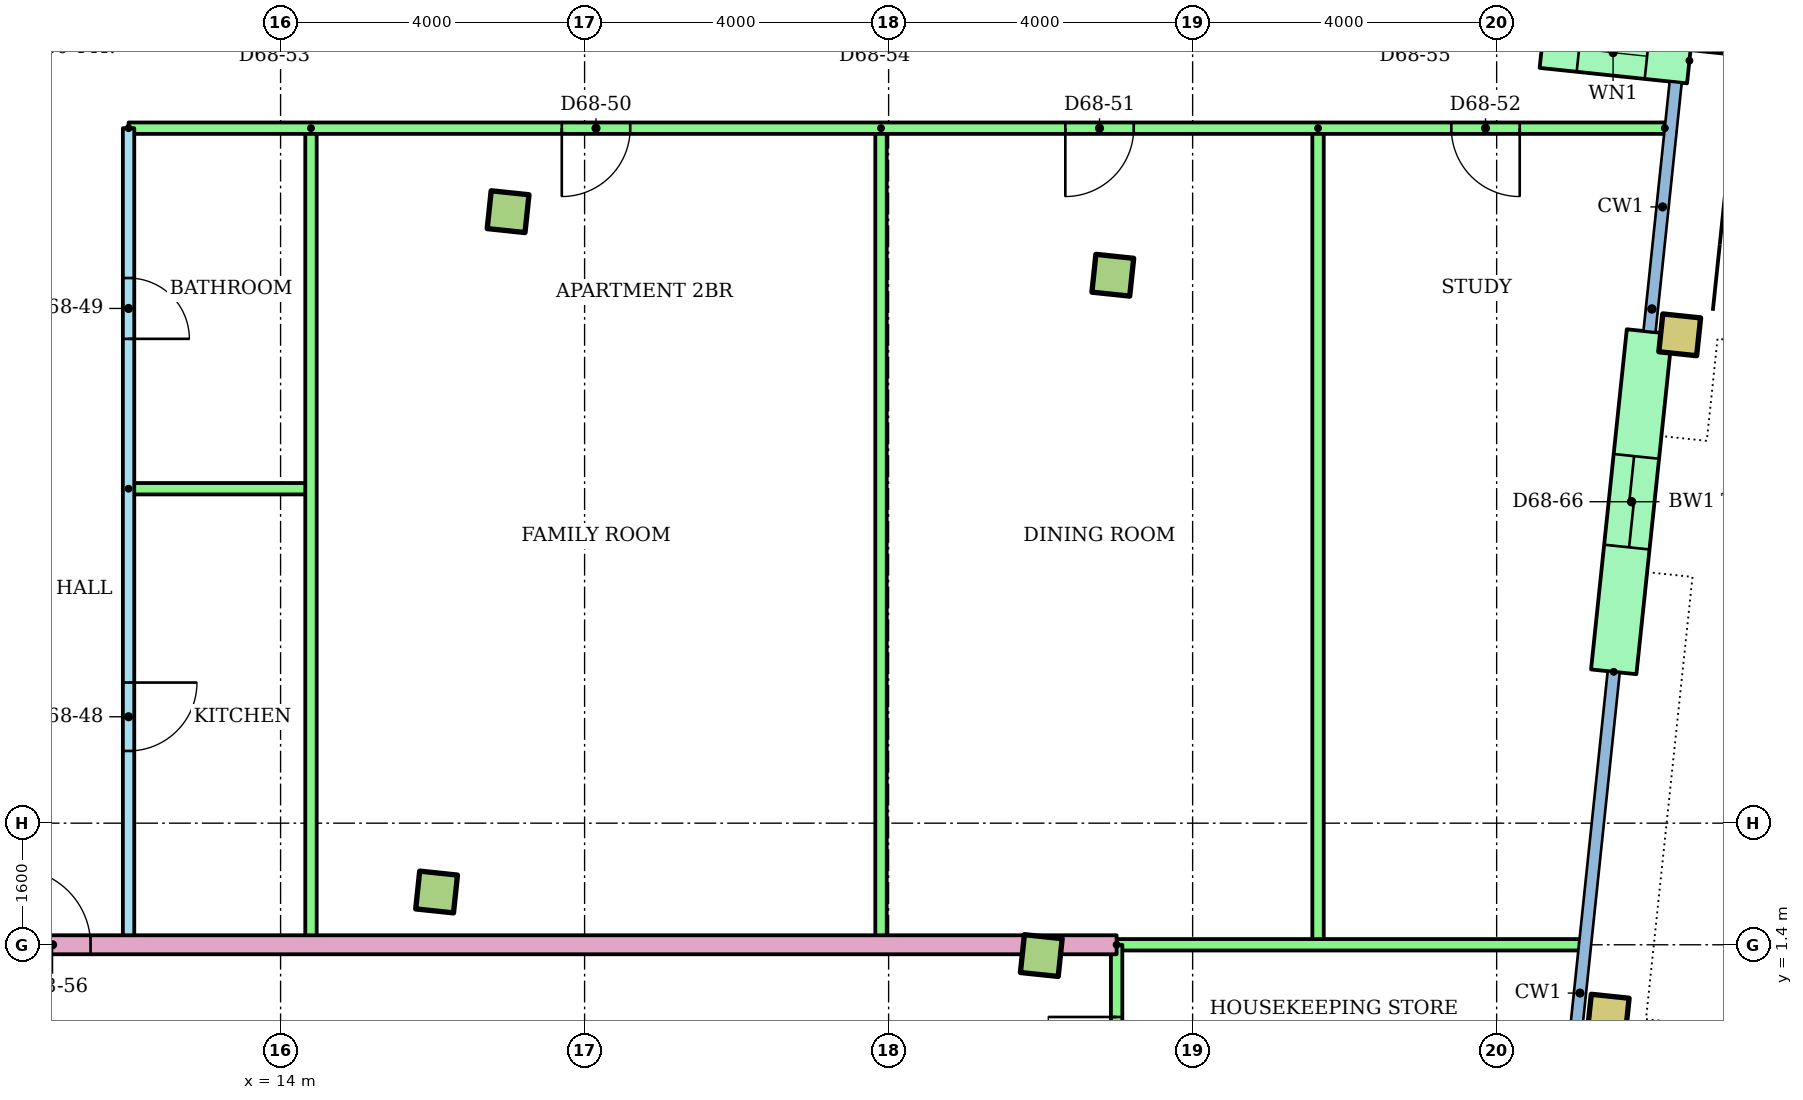
"""IFC4 building model, lengths in metres.
Left out: names, types, materials, properties, quantities, classifications, styles, units other than length and angle.
Written with IfcOpenShell. Run it as: python <this file> out.ifc"""

import sys

from ifc_helpers import new_model, si_unit, direction, frame, frame_2d, origin, origin_2d, place, context, subcontext, project, spatial, rectangle, hollow_rectangle, extrude, element, fill, save


model = new_model("IFC4")
c1 = context("Model", 3, precision=1e-05, world=origin(), true_north=direction((0.0, 1.0)))
c2 = subcontext(c1, "Body", "Model", "MODEL_VIEW")
j1 = project(units=[si_unit("LENGTHUNIT", "METRE"), si_unit("PLANEANGLEUNIT", "RADIAN")], contexts=[c1])
p1 = place(None, origin())
s1 = spatial("IfcSite", under=j1, at=p1, CompositionType="ELEMENT")
p2 = place(p1, origin())
s2 = spatial("IfcBuilding", under=s1, at=p2, CompositionType="ELEMENT")
p3 = place(p2, frame((0.0, 0.0, 262.7)))
s3 = spatial("IfcBuildingStorey", under=s2, at=p3, CompositionType="ELEMENT", Elevation=262.7)
for number, where, z_axis, x_axis in (
    (1, (16.053, 2.094, 0.0), (0.0, 0.0, 1.0), (0.995, -0.105, 0.0)),
    (2, (24.009, 1.258, 0.0), (0.0, 0.0, 1.0), (0.995, -0.105, 0.0)),
):
    element("IfcColumn", number, at=place(p3, frame(where, z_axis=z_axis, x_axis=x_axis)), inside=s3, PredefinedType="COLUMN", context=c2, shape_type="SweptSolid", body=[
        extrude(rectangle(XDim=0.5, YDim=0.5, at=origin_2d()), origin(), (0.0, 0.0, 1.0), 3.2),
    ])
p4 = place(p3, frame((31.468, 0.474, 0.0), z_axis=(0.0, 0.0, 1.0), x_axis=(0.994521895368, -0.104528463268, 0.0)))
e3 = element("IfcColumn", 3, at=p4, inside=s3, PredefinedType="COLUMN", context=c2, shape_type="SweptSolid", body=[
    extrude(hollow_rectangle(XDim=0.5, YDim=0.5, WallThickness=0.025, at=origin_2d()), origin(), (0.0, 0.0, 1.0), 3.2),
])
for number, where, z_axis, x_axis in (
    (4, (16.993, 11.045, 0.0), (0.0, 0.0, 1.0), (0.995, -0.105, 0.0)),
    (5, (24.95, 10.209, 0.0), (0.0, 0.0, 1.0), (0.995, -0.105, 0.0)),
):
    element("IfcColumn", number, at=place(p3, frame(where, z_axis=z_axis, x_axis=x_axis)), inside=s3, PredefinedType="COLUMN", context=c2, shape_type="SweptSolid", body=[
        extrude(rectangle(XDim=0.5, YDim=0.5, at=origin_2d()), origin(), (0.0, 0.0, 1.0), 3.2),
    ])
for number, where, z_axis, x_axis in (
    (6, (32.409, 9.425, 0.0), (0.0, 0.0, 1.0), (0.995, -0.105, 0.0)),
    (7, (32.827, 13.403, 0.0), (0.0, 0.0, 1.0), (0.995, -0.105, 0.0)),
):
    element("IfcColumn", number, at=place(p3, frame(where, z_axis=z_axis, x_axis=x_axis)), inside=s3, PredefinedType="COLUMN", context=c2, shape_type="SweptSolid", body=[
        extrude(hollow_rectangle(XDim=0.5, YDim=0.5, WallThickness=0.025, at=origin_2d()), origin(), (0.0, 0.0, 1.0), 3.2),
    ])
p5 = place(p3, frame((32.536, 13.031, 0.0), z_axis=(0.0, 0.0, 1.0), x_axis=(-0.994534226826, 0.104411070641, 0.0)))
e8 = element("IfcWall", 8, at=p5, inside=s3, PredefinedType="STANDARD", context=c2, shape_type="SweptSolid", body=[
    extrude(rectangle(XDim=1.95, YDim=0.6, at=frame_2d((0.975, 0.0))), origin(), (0.0, 0.0, 1.0), 2.92),
])
p6 = place(p5, frame((0.56, 0.0, 0.9)))
e9 = element("IfcOpeningElement", 9, at=p6, cuts=e8, PredefinedType="OPENING", context=c2, shape_type="SweptSolid", body=[
    extrude(rectangle(XDim=0.9, YDim=1.5, at=frame_2d((0.45, 0.75))), frame((0.0, 0.31, 0.0), z_axis=(0.0, -1.0, 0.0), x_axis=(1.0, 0.0, 0.0)), (0.0, 0.0, 1.0), 0.62),
])
p7 = place(p3, frame((31.54, 4.991, 0.0), z_axis=(0.0, 0.0, 1.0), x_axis=(0.104546400045, 0.994520009974, 0.0)))
e10 = element("IfcWall", 10, at=p7, inside=s3, PredefinedType="STANDARD", context=c2, shape_type="SweptSolid", body=[
    extrude(rectangle(XDim=4.5, YDim=0.6, at=frame_2d((2.25, 0.0))), origin(), (0.0, 0.0, 1.0), 2.92),
])
p8 = place(p7, frame((1.65, 0.0, 0.0)))
e11 = element("IfcOpeningElement", 11, at=p8, cuts=e10, PredefinedType="OPENING", context=c2, shape_type="SweptSolid", body=[
    extrude(rectangle(XDim=1.2, YDim=2.1, at=frame_2d((0.6, 1.05))), frame((0.0, 0.31, 0.0), z_axis=(0.0, -1.0, 0.0), x_axis=(1.0, 0.0, 0.0)), (0.0, 0.0, 1.0), 0.62),
])
p9 = place(p3, frame((12.0, 12.143, 0.0), z_axis=(0.0, 0.0, 1.0), x_axis=(0.0, -1.0, 0.0)))
e12 = element("IfcWall", 12, at=p9, inside=s3, PredefinedType="PARTITIONING", context=c2, shape_type="SweptSolid", body=[
    extrude(rectangle(XDim=10.743, YDim=0.15, at=frame_2d((5.372, 0.0))), origin(), (0.0, 0.0, 1.0), 2.4),
])
p10 = place(p9, frame((7.293, 0.0, 0.0)))
e13 = element("IfcOpeningElement", 13, at=p10, cuts=e12, PredefinedType="OPENING", context=c2, shape_type="SweptSolid", body=[
    extrude(rectangle(XDim=0.9, YDim=2.1, at=frame_2d((0.45, 1.05))), frame((0.0, 0.085, 0.0), z_axis=(0.0, -1.0, 0.0), x_axis=(1.0, 0.0, 0.0)), (0.0, 0.0, 1.0), 0.17),
])
p11 = place(p9, frame((1.972, 0.0, 0.0)))
e14 = element("IfcOpeningElement", 14, at=p11, cuts=e12, PredefinedType="OPENING", context=c2, shape_type="SweptSolid", body=[
    extrude(rectangle(XDim=0.8, YDim=2.1, at=frame_2d((0.4, 1.05))), frame((0.0, 0.085, 0.0), z_axis=(0.0, -1.0, 0.0), x_axis=(1.0, 0.0, 0.0)), (0.0, 0.0, 1.0), 0.17),
])
p12 = place(p3, frame((12.0, 7.4, 0.0)))
e15 = element("IfcWall", 15, at=p12, inside=s3, PredefinedType="PARTITIONING", context=c2, shape_type="SweptSolid", body=[
    extrude(rectangle(XDim=2.4, YDim=0.15, at=frame_2d((1.2, 0.0))), origin(), (0.0, 0.0, 1.0), 2.4),
])
for number, where, z_axis, x_axis in (
    (16, (14.4, 12.143, 0.0), (0.0, 0.0, 1.0), (0.0, -1.0, 0.0)),
    (17, (21.9, 12.143, 0.0), (0.0, 0.0, 1.0), (0.0, -1.0, 0.0)),
    (18, (27.65, 12.143, 0.0), (0.0, 0.0, 1.0), (0.0, -1.0, 0.0)),
):
    element("IfcWall", number, at=place(p3, frame(where, z_axis=z_axis, x_axis=x_axis)), inside=s3, PredefinedType="PARTITIONING", context=c2, shape_type="SweptSolid", body=[
        extrude(rectangle(XDim=10.743, YDim=0.15, at=frame_2d((5.372, 0.0))), origin(), (0.0, 0.0, 1.0), 2.4),
    ])
p13 = place(p3, frame((32.213, 12.143, 0.0), z_axis=(0.0, 0.0, 1.0), x_axis=(-1.0, 0.0, 0.0)))
e19 = element("IfcWall", 19, at=p13, inside=s3, PredefinedType="PARTITIONING", context=c2, shape_type="SweptSolid", body=[
    extrude(rectangle(XDim=20.213, YDim=0.15, at=frame_2d((10.106, 0.0))), origin(), (0.0, 0.0, 1.0), 2.4),
])
p14 = place(p13, frame((13.613, 0.0, 0.0)))
e20 = element("IfcOpeningElement", 20, at=p14, cuts=e19, PredefinedType="OPENING", context=c2, shape_type="SweptSolid", body=[
    extrude(rectangle(XDim=0.9, YDim=2.1, at=frame_2d((0.45, 1.05))), frame((0.0, 0.085, 0.0), z_axis=(0.0, -1.0, 0.0), x_axis=(1.0, 0.0, 0.0)), (0.0, 0.0, 1.0), 0.17),
])
p15 = place(p13, frame((6.988, 0.0, 0.0)))
e21 = element("IfcOpeningElement", 21, at=p15, cuts=e19, PredefinedType="OPENING", context=c2, shape_type="SweptSolid", body=[
    extrude(rectangle(XDim=0.9, YDim=2.1, at=frame_2d((0.45, 1.05))), frame((0.0, 0.085, 0.0), z_axis=(0.0, -1.0, 0.0), x_axis=(1.0, 0.0, 0.0)), (0.0, 0.0, 1.0), 0.17),
])
p16 = place(p13, frame((1.909, 0.0, 0.0)))
e22 = element("IfcOpeningElement", 22, at=p16, cuts=e19, PredefinedType="OPENING", context=c2, shape_type="SweptSolid", body=[
    extrude(rectangle(XDim=0.9, YDim=2.1, at=frame_2d((0.45, 1.05))), frame((0.0, 0.085, 0.0), z_axis=(0.0, -1.0, 0.0), x_axis=(1.0, 0.0, 0.0)), (0.0, 0.0, 1.0), 0.17),
])
p17 = place(p3, frame((10.0, 1.4, 0.0)))
e23 = element("IfcWall", 23, at=p17, inside=s3, PredefinedType="PARTITIONING", context=c2, shape_type="SweptSolid", body=[
    extrude(rectangle(XDim=15.0, YDim=0.25, at=frame_2d((7.5, 0.0))), origin(), (0.0, 0.0, 1.0), 2.4),
])
p18 = place(p17, frame((0.5, 0.0, 0.0)))
e24 = element("IfcOpeningElement", 24, at=p18, cuts=e23, PredefinedType="OPENING", context=c2, shape_type="SweptSolid", body=[
    extrude(rectangle(XDim=1.0, YDim=2.1, at=frame_2d((0.5, 1.05))), frame((0.0, 0.135, 0.0), z_axis=(0.0, -1.0, 0.0), x_axis=(1.0, 0.0, 0.0)), (0.0, 0.0, 1.0), 0.27),
])
p19 = place(p3, frame((25.0, 1.4, 0.0)))
e25 = element("IfcWall", 25, at=p19, inside=s3, PredefinedType="PARTITIONING", context=c2, shape_type="SweptSolid", body=[
    extrude(rectangle(XDim=6.093, YDim=0.15, at=frame_2d((3.046, 0.0))), origin(), (0.0, 0.0, 1.0), 2.4),
])
p20 = place(p3, frame((25.0, -1.4, 0.0), z_axis=(0.0, 0.0, 1.0), x_axis=(0.0, 1.0, 0.0)))
e26 = element("IfcWall", 26, at=p20, inside=s3, PredefinedType="PARTITIONING", context=c2, shape_type="SweptSolid", body=[
    extrude(rectangle(XDim=2.8, YDim=0.15, at=frame_2d((1.4, 0.0))), origin(), (0.0, 0.0, 1.0), 2.4),
])
p21 = place(p20, frame((0.95, 0.0, 0.0)))
e27 = element("IfcOpeningElement", 27, at=p21, cuts=e26, PredefinedType="OPENING", context=c2, shape_type="SweptSolid", body=[
    extrude(rectangle(XDim=0.9, YDim=2.1, at=frame_2d((0.45, 1.05))), frame((0.0, 0.085, 0.0), z_axis=(0.0, -1.0, 0.0), x_axis=(1.0, 0.0, 0.0)), (0.0, 0.0, 1.0), 0.17),
])
p22 = place(p6, origin())
e28 = element("IfcWindow", 28, at=p22, inside=s3, PartitioningType="SINGLE_PANEL", PredefinedType="WINDOW", context=c2, shape_type="SweptSolid", body=[
    extrude(rectangle(XDim=0.9, YDim=1.5, at=frame_2d((0.45, 0.75))), frame((0.0, 0.03, 0.0), z_axis=(0.0, -1.0, 0.0), x_axis=(1.0, 0.0, 0.0)), (0.0, 0.0, 1.0), 0.06),
])
fill(e9, e28)
p23 = place(p10, origin())
e29 = element("IfcDoor", 29, at=p23, inside=s3, OperationType="SINGLE_SWING_LEFT", PredefinedType="DOOR", context=c2, shape_type="SweptSolid", body=[
    extrude(rectangle(XDim=0.9, YDim=2.1, at=frame_2d((0.45, 1.05))), frame((0.0, 0.025, 0.0), z_axis=(0.0, -1.0, 0.0), x_axis=(1.0, 0.0, 0.0)), (0.0, 0.0, 1.0), 0.05),
])
fill(e13, e29)
p24 = place(p11, origin())
e30 = element("IfcDoor", 30, at=p24, inside=s3, OperationType="SINGLE_SWING_RIGHT", PredefinedType="DOOR", context=c2, shape_type="SweptSolid", body=[
    extrude(rectangle(XDim=0.8, YDim=2.1, at=frame_2d((0.4, 1.05))), frame((0.0, 0.025, 0.0), z_axis=(0.0, -1.0, 0.0), x_axis=(1.0, 0.0, 0.0)), (0.0, 0.0, 1.0), 0.05),
])
fill(e14, e30)
p25 = place(p14, origin())
e31 = element("IfcDoor", 31, at=p25, inside=s3, OperationType="SINGLE_SWING_RIGHT", PredefinedType="DOOR", context=c2, shape_type="SweptSolid", body=[
    extrude(rectangle(XDim=0.9, YDim=2.1, at=frame_2d((0.45, 1.05))), frame((0.0, 0.025, 0.0), z_axis=(0.0, -1.0, 0.0), x_axis=(1.0, 0.0, 0.0)), (0.0, 0.0, 1.0), 0.05),
])
fill(e20, e31)
p26 = place(p15, origin())
e32 = element("IfcDoor", 32, at=p26, inside=s3, OperationType="SINGLE_SWING_RIGHT", PredefinedType="DOOR", context=c2, shape_type="SweptSolid", body=[
    extrude(rectangle(XDim=0.9, YDim=2.1, at=frame_2d((0.45, 1.05))), frame((0.0, 0.025, 0.0), z_axis=(0.0, -1.0, 0.0), x_axis=(1.0, 0.0, 0.0)), (0.0, 0.0, 1.0), 0.05),
])
fill(e21, e32)
p27 = place(p16, origin())
e33 = element("IfcDoor", 33, at=p27, inside=s3, OperationType="SINGLE_SWING_LEFT", PredefinedType="DOOR", context=c2, shape_type="SweptSolid", body=[
    extrude(rectangle(XDim=0.9, YDim=2.1, at=frame_2d((0.45, 1.05))), frame((0.0, 0.025, 0.0), z_axis=(0.0, -1.0, 0.0), x_axis=(1.0, 0.0, 0.0)), (0.0, 0.0, 1.0), 0.05),
])
fill(e22, e33)
p28 = place(p18, origin())
e34 = element("IfcDoor", 34, at=p28, inside=s3, OperationType="SINGLE_SWING_LEFT", PredefinedType="DOOR", context=c2, shape_type="SweptSolid", body=[
    extrude(rectangle(XDim=1.0, YDim=2.1, at=frame_2d((0.5, 1.05))), frame((0.0, 0.025, 0.0), z_axis=(0.0, -1.0, 0.0), x_axis=(1.0, 0.0, 0.0)), (0.0, 0.0, 1.0), 0.05),
])
fill(e24, e34)
p29 = place(p21, origin())
e35 = element("IfcDoor", 35, at=p29, inside=s3, OperationType="SINGLE_SWING_RIGHT", PredefinedType="DOOR", context=c2, shape_type="SweptSolid", body=[
    extrude(rectangle(XDim=0.9, YDim=2.1, at=frame_2d((0.45, 1.05))), frame((0.0, 0.025, 0.0), z_axis=(0.0, -1.0, 0.0), x_axis=(1.0, 0.0, 0.0)), (0.0, 0.0, 1.0), 0.05),
])
fill(e27, e35)
p30 = place(p8, origin())
e36 = element("IfcDoor", 36, at=p30, inside=s3, OperationType="SLIDING_TO_LEFT", PredefinedType="DOOR", context=c2, shape_type="SweptSolid", body=[
    extrude(rectangle(XDim=1.2, YDim=2.1, at=frame_2d((0.6, 1.05))), frame((0.0, 0.025, 0.0), z_axis=(0.0, -1.0, 0.0), x_axis=(1.0, 0.0, 0.0)), (0.0, 0.0, 1.0), 0.05),
])
fill(e11, e36)
save(model, sys.argv[1])
